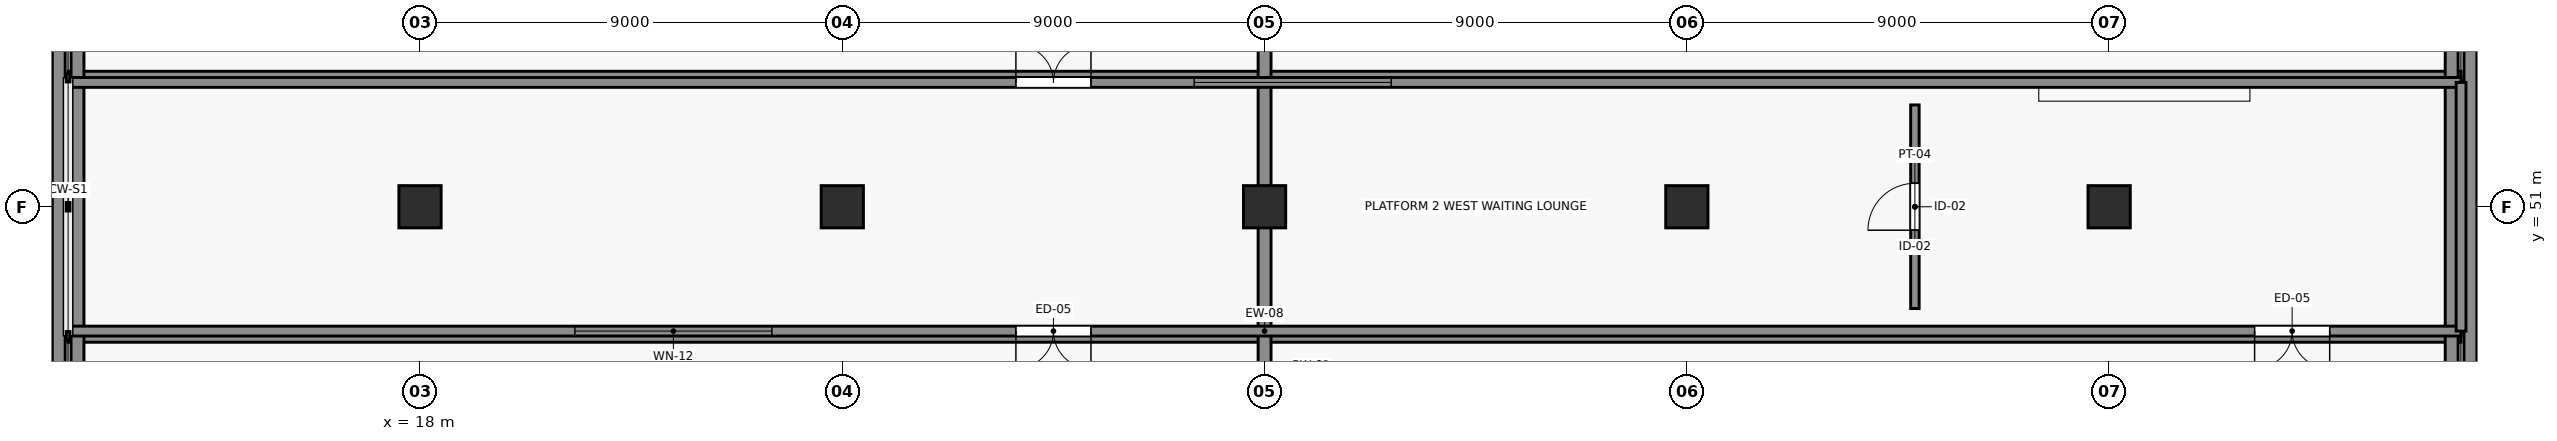
"""IFC4 building model, lengths in metres.
Left out: names, types, materials, properties, quantities, classifications, styles, units other than length and angle.
Written with IfcOpenShell. Run it as: python <this file> out.ifc"""

import sys

from ifc_helpers import new_model, si_unit, direction, frame, frame_2d, origin, origin_2d, place, context, subcontext, project, spatial, rectangle, extrude, element, fill, save


model = new_model("IFC4")
c1 = context("Model", 3, precision=1e-05, world=origin(), true_north=direction((0.0, 1.0)))
c2 = subcontext(c1, "Body", "Model", "MODEL_VIEW")
j1 = project(units=[si_unit("LENGTHUNIT", "METRE"), si_unit("PLANEANGLEUNIT", "RADIAN")], contexts=[c1])
p1 = place(None, origin())
s1 = spatial("IfcSite", under=j1, at=p1, CompositionType="ELEMENT")
p2 = place(p1, origin())
s2 = spatial("IfcBuilding", under=s1, at=p2, CompositionType="ELEMENT")
p3 = place(p2, origin())
s3 = spatial("IfcBuildingStorey", under=s2, at=p3, CompositionType="ELEMENT", Elevation=0.0)
for number, where, z_axis, x_axis in (
    (1, (10.5, 48.25, 0.0), (0.0, 0.0, 1.0), (1.0, 0.0, 0.0)),
    (2, (10.5, 53.75, 0.0), (0.0, 0.0, 1.0), (1.0, 0.0, 0.0)),
):
    element("IfcWall", number, at=place(p3, frame(where, z_axis=z_axis, x_axis=x_axis)), inside=s3, PredefinedType="SOLIDWALL", context=c2, shape_type="SweptSolid", body=[
        extrude(rectangle(XDim=51.0, YDim=0.275, at=frame_2d((25.5, 0.0))), origin(), (0.0, 0.0, 1.0), 0.675),
    ])
for number, where, z_axis, x_axis in (
    (3, (10.3, 47.25, 0.0), (0.0, 0.0, 1.0), (0.0, 1.0, 0.0)),
    (4, (10.7, 47.25, 0.0), (0.0, 0.0, 1.0), (0.0, 1.0, 0.0)),
    (5, (36.0, 47.25, 0.0), (0.0, 0.0, 1.0), (0.0, 1.0, 0.0)),
    (6, (61.3, 47.25, 0.0), (0.0, 0.0, 1.0), (0.0, 1.0, 0.0)),
    (7, (61.7, 47.25, 0.0), (0.0, 0.0, 1.0), (0.0, 1.0, 0.0)),
):
    element("IfcWall", number, at=place(p3, frame(where, z_axis=z_axis, x_axis=x_axis)), inside=s3, PredefinedType="SOLIDWALL", context=c2, shape_type="SweptSolid", body=[
        extrude(rectangle(XDim=7.5, YDim=0.275, at=frame_2d((3.75, 0.0))), origin(), (0.0, 0.0, 1.0), 0.675),
    ])
for number, where, z_axis, x_axis in (
    (8, (18.0, 51.0, 0.0), (0.0, 0.0, 1.0), (1.0, 0.0, 0.0)),
    (9, (27.0, 51.0, 0.0), (0.0, 0.0, 1.0), (1.0, 0.0, 0.0)),
    (10, (36.0, 51.0, 0.0), (0.0, 0.0, 1.0), (1.0, 0.0, 0.0)),
    (11, (45.0, 51.0, 0.0), (0.0, 0.0, 1.0), (1.0, 0.0, 0.0)),
    (12, (54.0, 51.0, 0.0), (0.0, 0.0, 1.0), (1.0, 0.0, 0.0)),
):
    element("IfcColumn", number, at=place(p3, frame(where, z_axis=z_axis, x_axis=x_axis)), inside=s3, PredefinedType="COLUMN", context=c2, shape_type="SweptSolid", body=[
        extrude(rectangle(XDim=0.9, YDim=0.9, at=origin_2d()), origin(), (0.0, 0.0, 1.0), 4.8),
    ])
p4 = place(p3, frame((61.5, 48.35, 0.915), z_axis=(0.0, 0.0, 1.0), x_axis=(-1.0, 0.0, 0.0)))
e13 = element("IfcWall", 13, at=p4, inside=s3, PredefinedType="SOLIDWALL", context=c2, shape_type="SweptSolid", body=[
    extrude(rectangle(XDim=51.0, YDim=0.21, at=frame_2d((25.5, 0.0))), origin(), (0.0, 0.0, 1.0), 3.185),
])
p5 = place(p4, frame((29.2, 0.0, 0.0)))
e14 = element("IfcOpeningElement", 14, at=p5, cuts=e13, PredefinedType="OPENING", context=c2, shape_type="SweptSolid", body=[
    extrude(rectangle(XDim=1.6, YDim=2.3, at=frame_2d((0.8, 1.15))), frame((0.0, 0.115, 0.0), z_axis=(0.0, -1.0, 0.0), x_axis=(1.0, 0.0, 0.0)), (0.0, 0.0, 1.0), 0.23),
])
p6 = place(p4, frame((2.8, 0.0, 0.0)))
e15 = element("IfcOpeningElement", 15, at=p6, cuts=e13, PredefinedType="OPENING", context=c2, shape_type="SweptSolid", body=[
    extrude(rectangle(XDim=1.6, YDim=2.3, at=frame_2d((0.8, 1.15))), frame((0.0, 0.115, 0.0), z_axis=(0.0, -1.0, 0.0), x_axis=(1.0, 0.0, 0.0)), (0.0, 0.0, 1.0), 0.23),
])
p7 = place(p4, frame((36.0, 0.0, 0.9)))
e16 = element("IfcOpeningElement", 16, at=p7, cuts=e13, PredefinedType="OPENING", context=c2, shape_type="SweptSolid", body=[
    extrude(rectangle(XDim=4.2, YDim=1.5, at=frame_2d((2.1, 0.75))), frame((0.0, 0.115, 0.0), z_axis=(0.0, -1.0, 0.0), x_axis=(1.0, 0.0, 0.0)), (0.0, 0.0, 1.0), 0.23),
])
p8 = place(p3, frame((10.5, 53.65, 0.915), z_axis=(0.0, 0.0, 1.0), x_axis=(1.0, 0.0, 0.0)))
e17 = element("IfcWall", 17, at=p8, inside=s3, PredefinedType="SOLIDWALL", context=c2, shape_type="SweptSolid", body=[
    extrude(rectangle(XDim=51.0, YDim=0.21, at=frame_2d((25.5, 0.0))), origin(), (0.0, 0.0, 1.0), 3.185),
])
p9 = place(p8, frame((20.2, 0.0, 0.0)))
e18 = element("IfcOpeningElement", 18, at=p9, cuts=e17, PredefinedType="OPENING", context=c2, shape_type="SweptSolid", body=[
    extrude(rectangle(XDim=1.6, YDim=2.3, at=frame_2d((0.8, 1.15))), frame((0.0, 0.115, 0.0), z_axis=(0.0, -1.0, 0.0), x_axis=(1.0, 0.0, 0.0)), (0.0, 0.0, 1.0), 0.23),
])
p10 = place(p8, frame((24.0, 0.0, 0.9)))
e19 = element("IfcOpeningElement", 19, at=p10, cuts=e17, PredefinedType="OPENING", context=c2, shape_type="SweptSolid", body=[
    extrude(rectangle(XDim=4.2, YDim=1.5, at=frame_2d((2.1, 0.75))), frame((0.0, 0.115, 0.0), z_axis=(0.0, -1.0, 0.0), x_axis=(1.0, 0.0, 0.0)), (0.0, 0.0, 1.0), 0.23),
])
p11 = place(p3, frame((61.5, 53.65, 0.915), z_axis=(0.0, 0.0, 1.0), x_axis=(0.0, -1.0, 0.0)))
e20 = element("IfcWall", 20, at=p11, inside=s3, PredefinedType="SOLIDWALL", context=c2, shape_type="SweptSolid", body=[
    extrude(rectangle(XDim=5.3, YDim=0.21, at=frame_2d((2.65, 0.0))), origin(), (0.0, 0.0, 1.0), 3.185),
])
p12 = place(p3, frame((49.86, 48.83, 0.915), z_axis=(0.0, 0.0, 1.0), x_axis=(0.0, 1.0, 0.0)))
e21 = element("IfcWall", 21, at=p12, inside=s3, PredefinedType="PARTITIONING", context=c2, shape_type="SweptSolid", body=[
    extrude(rectangle(XDim=4.34, YDim=0.18, at=frame_2d((2.17, 0.0))), origin(), (0.0, 0.0, 1.0), 3.435),
])
p13 = place(p12, frame((1.67, 0.0, 0.0)))
e22 = element("IfcOpeningElement", 22, at=p13, cuts=e21, PredefinedType="OPENING", context=c2, shape_type="SweptSolid", body=[
    extrude(rectangle(XDim=1.0, YDim=2.15, at=frame_2d((0.5, 1.075))), frame((0.0, 0.1, 0.0), z_axis=(0.0, -1.0, 0.0), x_axis=(1.0, 0.0, 0.0)), (0.0, 0.0, 1.0), 0.2),
])
p14 = place(p5, origin())
e23 = element("IfcDoor", 23, at=p14, inside=s3, OperationType="DOUBLE_DOOR_SINGLE_SWING", PredefinedType="DOOR", context=c2, shape_type="SweptSolid", body=[
    extrude(rectangle(XDim=1.6, YDim=2.3, at=frame_2d((0.8, 1.15))), frame((0.0, 0.025, 0.0), z_axis=(0.0, -1.0, 0.0), x_axis=(1.0, 0.0, 0.0)), (0.0, 0.0, 1.0), 0.05),
])
fill(e14, e23)
p15 = place(p6, origin())
e24 = element("IfcDoor", 24, at=p15, inside=s3, OperationType="DOUBLE_DOOR_SINGLE_SWING", PredefinedType="DOOR", context=c2, shape_type="SweptSolid", body=[
    extrude(rectangle(XDim=1.6, YDim=2.3, at=frame_2d((0.8, 1.15))), frame((0.0, 0.025, 0.0), z_axis=(0.0, -1.0, 0.0), x_axis=(1.0, 0.0, 0.0)), (0.0, 0.0, 1.0), 0.05),
])
fill(e15, e24)
p16 = place(p9, origin())
e25 = element("IfcDoor", 25, at=p16, inside=s3, OperationType="DOUBLE_DOOR_SINGLE_SWING", PredefinedType="DOOR", context=c2, shape_type="SweptSolid", body=[
    extrude(rectangle(XDim=1.6, YDim=2.3, at=frame_2d((0.8, 1.15))), frame((0.0, 0.025, 0.0), z_axis=(0.0, -1.0, 0.0), x_axis=(1.0, 0.0, 0.0)), (0.0, 0.0, 1.0), 0.05),
])
fill(e18, e25)
p17 = place(p7, origin())
e26 = element("IfcWindow", 26, at=p17, inside=s3, PartitioningType="SINGLE_PANEL", PredefinedType="WINDOW", context=c2, shape_type="SweptSolid", body=[
    extrude(rectangle(XDim=4.2, YDim=1.5, at=frame_2d((2.1, 0.75))), frame((0.0, 0.03, 0.0), z_axis=(0.0, -1.0, 0.0), x_axis=(1.0, 0.0, 0.0)), (0.0, 0.0, 1.0), 0.06),
])
fill(e16, e26)
p18 = place(p10, origin())
e27 = element("IfcWindow", 27, at=p18, inside=s3, PartitioningType="SINGLE_PANEL", PredefinedType="WINDOW", context=c2, shape_type="SweptSolid", body=[
    extrude(rectangle(XDim=4.2, YDim=1.5, at=frame_2d((2.1, 0.75))), frame((0.0, 0.03, 0.0), z_axis=(0.0, -1.0, 0.0), x_axis=(1.0, 0.0, 0.0)), (0.0, 0.0, 1.0), 0.06),
])
fill(e19, e27)
p19 = place(p13, origin())
e28 = element("IfcDoor", 28, at=p19, inside=s3, OperationType="SINGLE_SWING_LEFT", PredefinedType="DOOR", context=c2, shape_type="SweptSolid", body=[
    extrude(rectangle(XDim=1.0, YDim=2.15, at=frame_2d((0.5, 1.075))), frame((0.0, 0.025, 0.0), z_axis=(0.0, -1.0, 0.0), x_axis=(1.0, 0.0, 0.0)), (0.0, 0.0, 1.0), 0.05),
])
fill(e22, e28)
save(model, sys.argv[1])
